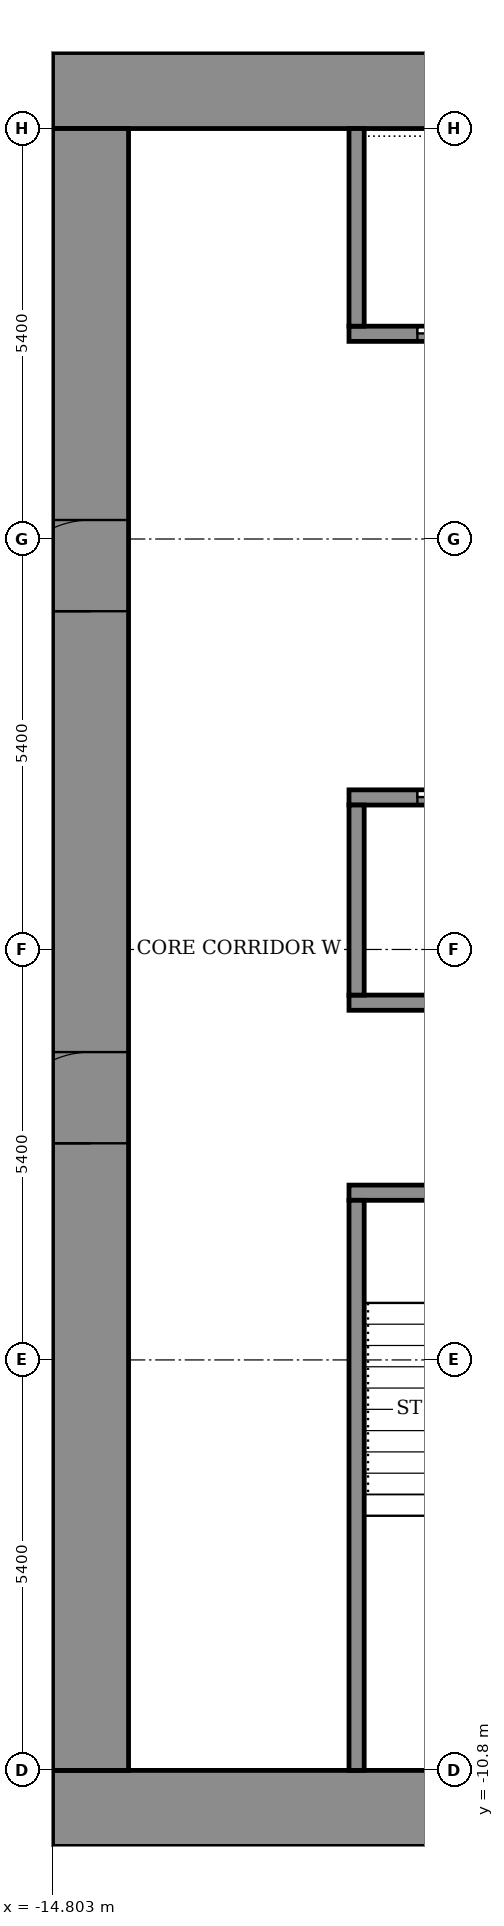
"""IFC4 building model, lengths in metres.
Left out: names, types, materials, properties, quantities, classifications, styles, units other than length and angle.
Written with IfcOpenShell. Run it as: python <this file> out.ifc"""

import sys

from ifc_helpers import new_model, si_unit, direction, frame, frame_2d, origin, place, context, subcontext, project, spatial, rectangle, extrude, element, fill, save


model = new_model("IFC4")
c1 = context("Model", 3, precision=1e-05, world=origin(), true_north=direction((0.0, 1.0)))
c2 = subcontext(c1, "Body", "Model", "MODEL_VIEW")
j1 = project(units=[si_unit("LENGTHUNIT", "METRE"), si_unit("PLANEANGLEUNIT", "RADIAN")], contexts=[c1])
p1 = place(None, origin())
s1 = spatial("IfcSite", under=j1, at=p1, CompositionType="ELEMENT")
p2 = place(p1, origin())
s2 = spatial("IfcBuilding", under=s1, at=p2, CompositionType="ELEMENT")
p3 = place(p2, frame((0.0, 0.0, 90.1)))
s3 = spatial("IfcBuildingStorey", under=s2, at=p3, CompositionType="ELEMENT", Elevation=90.1)
for number, where, z_axis, x_axis in (
    (1, (-14.8, -11.3, 0.0), (0.0, 0.0, 1.0), (1.0, 0.0, 0.0)),
    (2, (-14.8, 11.3, 0.0), (0.0, 0.0, 1.0), (1.0, 0.0, 0.0)),
):
    element("IfcWall", number, at=place(p3, frame(where, z_axis=z_axis, x_axis=x_axis)), inside=s3, PredefinedType="SHEAR", context=c2, shape_type="SweptSolid", body=[
        extrude(rectangle(XDim=29.6, YDim=1.0, at=frame_2d((14.8, 0.0))), origin(), (0.0, 0.0, 1.0), 3.6),
    ])
p4 = place(p3, frame((-14.3, -10.8, 0.0), z_axis=(0.0, 0.0, 1.0), x_axis=(0.0, 1.0, 0.0)))
e3 = element("IfcWall", 3, at=p4, inside=s3, PredefinedType="SHEAR", context=c2, shape_type="SweptSolid", body=[
    extrude(rectangle(XDim=21.6, YDim=1.0, at=frame_2d((10.8, 0.0))), origin(), (0.0, 0.0, 1.0), 3.6),
])
p5 = place(p4, frame((8.25, 0.0, 0.0)))
e4 = element("IfcOpeningElement", 4, at=p5, cuts=e3, PredefinedType="OPENING", context=c2, shape_type="SweptSolid", body=[
    extrude(rectangle(XDim=1.2, YDim=2.1, at=frame_2d((0.6, 1.05))), frame((0.0, 0.51, 0.0), z_axis=(0.0, -1.0, 0.0), x_axis=(1.0, 0.0, 0.0)), (0.0, 0.0, 1.0), 1.02),
])
p6 = place(p4, frame((15.25, 0.0, 0.0)))
e5 = element("IfcOpeningElement", 5, at=p6, cuts=e3, PredefinedType="OPENING", context=c2, shape_type="SweptSolid", body=[
    extrude(rectangle(XDim=1.2, YDim=2.1, at=frame_2d((0.6, 1.05))), frame((0.0, 0.51, 0.0), z_axis=(0.0, -1.0, 0.0), x_axis=(1.0, 0.0, 0.0)), (0.0, 0.0, 1.0), 1.02),
])
p7 = place(p3, frame((-10.9, -3.2, 0.0), z_axis=(0.0, 0.0, 1.0), x_axis=(1.0, 0.0, 0.0)))
e6 = element("IfcWall", 6, at=p7, inside=s3, PredefinedType="SHEAR", context=c2, shape_type="SweptSolid", body=[
    extrude(rectangle(XDim=21.8, YDim=0.2, at=frame_2d((10.9, 0.0))), origin(), (0.0, 0.0, 1.0), 3.05),
])
p8 = place(p7, frame((1.075, 0.0, 0.0)))
e7 = element("IfcOpeningElement", 7, at=p8, cuts=e6, PredefinedType="OPENING", context=c2, shape_type="SweptSolid", body=[
    extrude(rectangle(XDim=1.1, YDim=2.1, at=frame_2d((0.55, 1.05))), frame((0.0, 0.11, 0.0), z_axis=(0.0, -1.0, 0.0), x_axis=(1.0, 0.0, 0.0)), (0.0, 0.0, 1.0), 0.22),
])
p9 = place(p7, frame((10.325, 0.0, 0.0)))
e8 = element("IfcOpeningElement", 8, at=p9, cuts=e6, PredefinedType="OPENING", context=c2, shape_type="SweptSolid", body=[
    extrude(rectangle(XDim=1.1, YDim=2.1, at=frame_2d((0.55, 1.05))), frame((0.0, 0.11, 0.0), z_axis=(0.0, -1.0, 0.0), x_axis=(1.0, 0.0, 0.0)), (0.0, 0.0, 1.0), 0.22),
])
p10 = place(p7, frame((19.625, 0.0, 0.0)))
e9 = element("IfcOpeningElement", 9, at=p10, cuts=e6, PredefinedType="OPENING", context=c2, shape_type="SweptSolid", body=[
    extrude(rectangle(XDim=1.1, YDim=2.1, at=frame_2d((0.55, 1.05))), frame((0.0, 0.11, 0.0), z_axis=(0.0, -1.0, 0.0), x_axis=(1.0, 0.0, 0.0)), (0.0, 0.0, 1.0), 0.22),
])
p11 = place(p7, frame((5.7, 0.0, 0.0)))
e10 = element("IfcOpeningElement", 10, at=p11, cuts=e6, PredefinedType="OPENING", context=c2, shape_type="SweptSolid", body=[
    extrude(rectangle(XDim=1.1, YDim=2.1, at=frame_2d((0.55, 1.05))), frame((0.0, 0.11, 0.0), z_axis=(0.0, -1.0, 0.0), x_axis=(1.0, 0.0, 0.0)), (0.0, 0.0, 1.0), 0.22),
])
p12 = place(p7, frame((14.975, 0.0, 0.0)))
e11 = element("IfcOpeningElement", 11, at=p12, cuts=e6, PredefinedType="OPENING", context=c2, shape_type="SweptSolid", body=[
    extrude(rectangle(XDim=1.1, YDim=2.1, at=frame_2d((0.55, 1.05))), frame((0.0, 0.11, 0.0), z_axis=(0.0, -1.0, 0.0), x_axis=(1.0, 0.0, 0.0)), (0.0, 0.0, 1.0), 0.22),
])
p13 = place(p3, frame((-10.9, -0.7, 0.0), z_axis=(0.0, 0.0, 1.0), x_axis=(1.0, 0.0, 0.0)))
e12 = element("IfcWall", 12, at=p13, inside=s3, PredefinedType="SHEAR", context=c2, shape_type="SweptSolid", body=[
    extrude(rectangle(XDim=21.8, YDim=0.2, at=frame_2d((10.9, 0.0))), origin(), (0.0, 0.0, 1.0), 3.05),
])
p14 = place(p3, frame((-10.9, 2.0, 0.0), z_axis=(0.0, 0.0, 1.0), x_axis=(1.0, 0.0, 0.0)))
e13 = element("IfcWall", 13, at=p14, inside=s3, PredefinedType="SHEAR", context=c2, shape_type="SweptSolid", body=[
    extrude(rectangle(XDim=21.8, YDim=0.2, at=frame_2d((10.9, 0.0))), origin(), (0.0, 0.0, 1.0), 3.05),
])
p15 = place(p14, frame((0.9, 0.0, 0.0)))
e14 = element("IfcOpeningElement", 14, at=p15, cuts=e13, PredefinedType="OPENING", context=c2, shape_type="SweptSolid", body=[
    extrude(rectangle(XDim=1.1, YDim=2.1, at=frame_2d((0.55, 1.05))), frame((0.0, 0.11, 0.0), z_axis=(0.0, -1.0, 0.0), x_axis=(1.0, 0.0, 0.0)), (0.0, 0.0, 1.0), 0.22),
])
p16 = place(p14, frame((3.6, 0.0, 0.0)))
e15 = element("IfcOpeningElement", 15, at=p16, cuts=e13, PredefinedType="OPENING", context=c2, shape_type="SweptSolid", body=[
    extrude(rectangle(XDim=1.1, YDim=2.1, at=frame_2d((0.55, 1.05))), frame((0.0, 0.11, 0.0), z_axis=(0.0, -1.0, 0.0), x_axis=(1.0, 0.0, 0.0)), (0.0, 0.0, 1.0), 0.22),
])
p17 = place(p14, frame((6.3, 0.0, 0.0)))
e16 = element("IfcOpeningElement", 16, at=p17, cuts=e13, PredefinedType="OPENING", context=c2, shape_type="SweptSolid", body=[
    extrude(rectangle(XDim=1.1, YDim=2.1, at=frame_2d((0.55, 1.05))), frame((0.0, 0.11, 0.0), z_axis=(0.0, -1.0, 0.0), x_axis=(1.0, 0.0, 0.0)), (0.0, 0.0, 1.0), 0.22),
])
p18 = place(p14, frame((9.0, 0.0, 0.0)))
e17 = element("IfcOpeningElement", 17, at=p18, cuts=e13, PredefinedType="OPENING", context=c2, shape_type="SweptSolid", body=[
    extrude(rectangle(XDim=1.1, YDim=2.1, at=frame_2d((0.55, 1.05))), frame((0.0, 0.11, 0.0), z_axis=(0.0, -1.0, 0.0), x_axis=(1.0, 0.0, 0.0)), (0.0, 0.0, 1.0), 0.22),
])
p19 = place(p14, frame((11.7, 0.0, 0.0)))
e18 = element("IfcOpeningElement", 18, at=p19, cuts=e13, PredefinedType="OPENING", context=c2, shape_type="SweptSolid", body=[
    extrude(rectangle(XDim=1.1, YDim=2.1, at=frame_2d((0.55, 1.05))), frame((0.0, 0.11, 0.0), z_axis=(0.0, -1.0, 0.0), x_axis=(1.0, 0.0, 0.0)), (0.0, 0.0, 1.0), 0.22),
])
p20 = place(p14, frame((15.175, 0.0, 0.0)))
e19 = element("IfcOpeningElement", 19, at=p20, cuts=e13, PredefinedType="OPENING", context=c2, shape_type="SweptSolid", body=[
    extrude(rectangle(XDim=0.9, YDim=2.1, at=frame_2d((0.45, 1.05))), frame((0.0, 0.11, 0.0), z_axis=(0.0, -1.0, 0.0), x_axis=(1.0, 0.0, 0.0)), (0.0, 0.0, 1.0), 0.22),
])
p21 = place(p14, frame((19.225, 0.0, 0.0)))
e20 = element("IfcOpeningElement", 20, at=p21, cuts=e13, PredefinedType="OPENING", context=c2, shape_type="SweptSolid", body=[
    extrude(rectangle(XDim=0.9, YDim=2.1, at=frame_2d((0.45, 1.05))), frame((0.0, 0.11, 0.0), z_axis=(0.0, -1.0, 0.0), x_axis=(1.0, 0.0, 0.0)), (0.0, 0.0, 1.0), 0.22),
])
p22 = place(p3, frame((-10.9, 8.1, 0.0), z_axis=(0.0, 0.0, 1.0), x_axis=(1.0, 0.0, 0.0)))
e21 = element("IfcWall", 21, at=p22, inside=s3, PredefinedType="SHEAR", context=c2, shape_type="SweptSolid", body=[
    extrude(rectangle(XDim=21.8, YDim=0.2, at=frame_2d((10.9, 0.0))), origin(), (0.0, 0.0, 1.0), 3.05),
])
p23 = place(p22, frame((0.9, 0.0, 0.0)))
e22 = element("IfcOpeningElement", 22, at=p23, cuts=e21, PredefinedType="OPENING", context=c2, shape_type="SweptSolid", body=[
    extrude(rectangle(XDim=1.1, YDim=2.1, at=frame_2d((0.55, 1.05))), frame((0.0, 0.11, 0.0), z_axis=(0.0, -1.0, 0.0), x_axis=(1.0, 0.0, 0.0)), (0.0, 0.0, 1.0), 0.22),
])
p24 = place(p22, frame((3.6, 0.0, 0.0)))
e23 = element("IfcOpeningElement", 23, at=p24, cuts=e21, PredefinedType="OPENING", context=c2, shape_type="SweptSolid", body=[
    extrude(rectangle(XDim=1.1, YDim=2.1, at=frame_2d((0.55, 1.05))), frame((0.0, 0.11, 0.0), z_axis=(0.0, -1.0, 0.0), x_axis=(1.0, 0.0, 0.0)), (0.0, 0.0, 1.0), 0.22),
])
p25 = place(p22, frame((6.3, 0.0, 0.0)))
e24 = element("IfcOpeningElement", 24, at=p25, cuts=e21, PredefinedType="OPENING", context=c2, shape_type="SweptSolid", body=[
    extrude(rectangle(XDim=1.1, YDim=2.1, at=frame_2d((0.55, 1.05))), frame((0.0, 0.11, 0.0), z_axis=(0.0, -1.0, 0.0), x_axis=(1.0, 0.0, 0.0)), (0.0, 0.0, 1.0), 0.22),
])
p26 = place(p22, frame((9.0, 0.0, 0.0)))
e25 = element("IfcOpeningElement", 25, at=p26, cuts=e21, PredefinedType="OPENING", context=c2, shape_type="SweptSolid", body=[
    extrude(rectangle(XDim=1.1, YDim=2.1, at=frame_2d((0.55, 1.05))), frame((0.0, 0.11, 0.0), z_axis=(0.0, -1.0, 0.0), x_axis=(1.0, 0.0, 0.0)), (0.0, 0.0, 1.0), 0.22),
])
p27 = place(p22, frame((11.7, 0.0, 0.0)))
e26 = element("IfcOpeningElement", 26, at=p27, cuts=e21, PredefinedType="OPENING", context=c2, shape_type="SweptSolid", body=[
    extrude(rectangle(XDim=1.1, YDim=2.1, at=frame_2d((0.55, 1.05))), frame((0.0, 0.11, 0.0), z_axis=(0.0, -1.0, 0.0), x_axis=(1.0, 0.0, 0.0)), (0.0, 0.0, 1.0), 0.22),
])
p28 = place(p22, frame((15.175, 0.0, 0.0)))
e27 = element("IfcOpeningElement", 27, at=p28, cuts=e21, PredefinedType="OPENING", context=c2, shape_type="SweptSolid", body=[
    extrude(rectangle(XDim=0.9, YDim=2.1, at=frame_2d((0.45, 1.05))), frame((0.0, 0.11, 0.0), z_axis=(0.0, -1.0, 0.0), x_axis=(1.0, 0.0, 0.0)), (0.0, 0.0, 1.0), 0.22),
])
p29 = place(p22, frame((19.225, 0.0, 0.0)))
e28 = element("IfcOpeningElement", 28, at=p29, cuts=e21, PredefinedType="OPENING", context=c2, shape_type="SweptSolid", body=[
    extrude(rectangle(XDim=0.9, YDim=2.1, at=frame_2d((0.45, 1.05))), frame((0.0, 0.11, 0.0), z_axis=(0.0, -1.0, 0.0), x_axis=(1.0, 0.0, 0.0)), (0.0, 0.0, 1.0), 0.22),
])
p30 = place(p3, frame((-10.8, -10.8, 0.0), z_axis=(0.0, 0.0, 1.0), x_axis=(0.0, 1.0, 0.0)))
e29 = element("IfcWall", 29, at=p30, inside=s3, PredefinedType="SHEAR", context=c2, shape_type="SweptSolid", body=[
    extrude(rectangle(XDim=7.5, YDim=0.2, at=frame_2d((3.75, 0.0))), origin(), (0.0, 0.0, 1.0), 3.05),
])
p31 = place(p3, frame((-10.8, -0.6, 0.0), z_axis=(0.0, 0.0, 1.0), x_axis=(0.0, 1.0, 0.0)))
e30 = element("IfcWall", 30, at=p31, inside=s3, PredefinedType="SHEAR", context=c2, shape_type="SweptSolid", body=[
    extrude(rectangle(XDim=2.5, YDim=0.2, at=frame_2d((1.25, 0.0))), origin(), (0.0, 0.0, 1.0), 3.05),
])
p32 = place(p3, frame((-10.8, 8.2, 0.0), z_axis=(0.0, 0.0, 1.0), x_axis=(0.0, 1.0, 0.0)))
e31 = element("IfcWall", 31, at=p32, inside=s3, PredefinedType="SHEAR", context=c2, shape_type="SweptSolid", body=[
    extrude(rectangle(XDim=2.6, YDim=0.2, at=frame_2d((1.3, 0.0))), origin(), (0.0, 0.0, 1.0), 3.05),
])
p33 = place(p5, origin())
e32 = element("IfcDoor", 32, at=p33, inside=s3, OperationType="DOUBLE_DOOR_SINGLE_SWING", PredefinedType="DOOR", context=c2, shape_type="SweptSolid", body=[
    extrude(rectangle(XDim=1.2, YDim=2.1, at=frame_2d((0.6, 1.05))), frame((0.0, 0.025, 0.0), z_axis=(0.0, -1.0, 0.0), x_axis=(1.0, 0.0, 0.0)), (0.0, 0.0, 1.0), 0.05),
])
fill(e4, e32)
p34 = place(p6, origin())
e33 = element("IfcDoor", 33, at=p34, inside=s3, OperationType="DOUBLE_DOOR_SINGLE_SWING", PredefinedType="DOOR", context=c2, shape_type="SweptSolid", body=[
    extrude(rectangle(XDim=1.2, YDim=2.1, at=frame_2d((0.6, 1.05))), frame((0.0, 0.025, 0.0), z_axis=(0.0, -1.0, 0.0), x_axis=(1.0, 0.0, 0.0)), (0.0, 0.0, 1.0), 0.05),
])
fill(e5, e33)
p35 = place(p15, origin())
e34 = element("IfcDoor", 34, at=p35, inside=s3, OperationType="SLIDING_TO_LEFT", PredefinedType="DOOR", context=c2, shape_type="SweptSolid", body=[
    extrude(rectangle(XDim=1.1, YDim=2.1, at=frame_2d((0.55, 1.05))), frame((0.0, 0.025, 0.0), z_axis=(0.0, -1.0, 0.0), x_axis=(1.0, 0.0, 0.0)), (0.0, 0.0, 1.0), 0.05),
])
fill(e14, e34)
p36 = place(p23, origin())
e35 = element("IfcDoor", 35, at=p36, inside=s3, OperationType="SLIDING_TO_LEFT", PredefinedType="DOOR", context=c2, shape_type="SweptSolid", body=[
    extrude(rectangle(XDim=1.1, YDim=2.1, at=frame_2d((0.55, 1.05))), frame((0.0, 0.025, 0.0), z_axis=(0.0, -1.0, 0.0), x_axis=(1.0, 0.0, 0.0)), (0.0, 0.0, 1.0), 0.05),
])
fill(e22, e35)
save(model, sys.argv[1])
